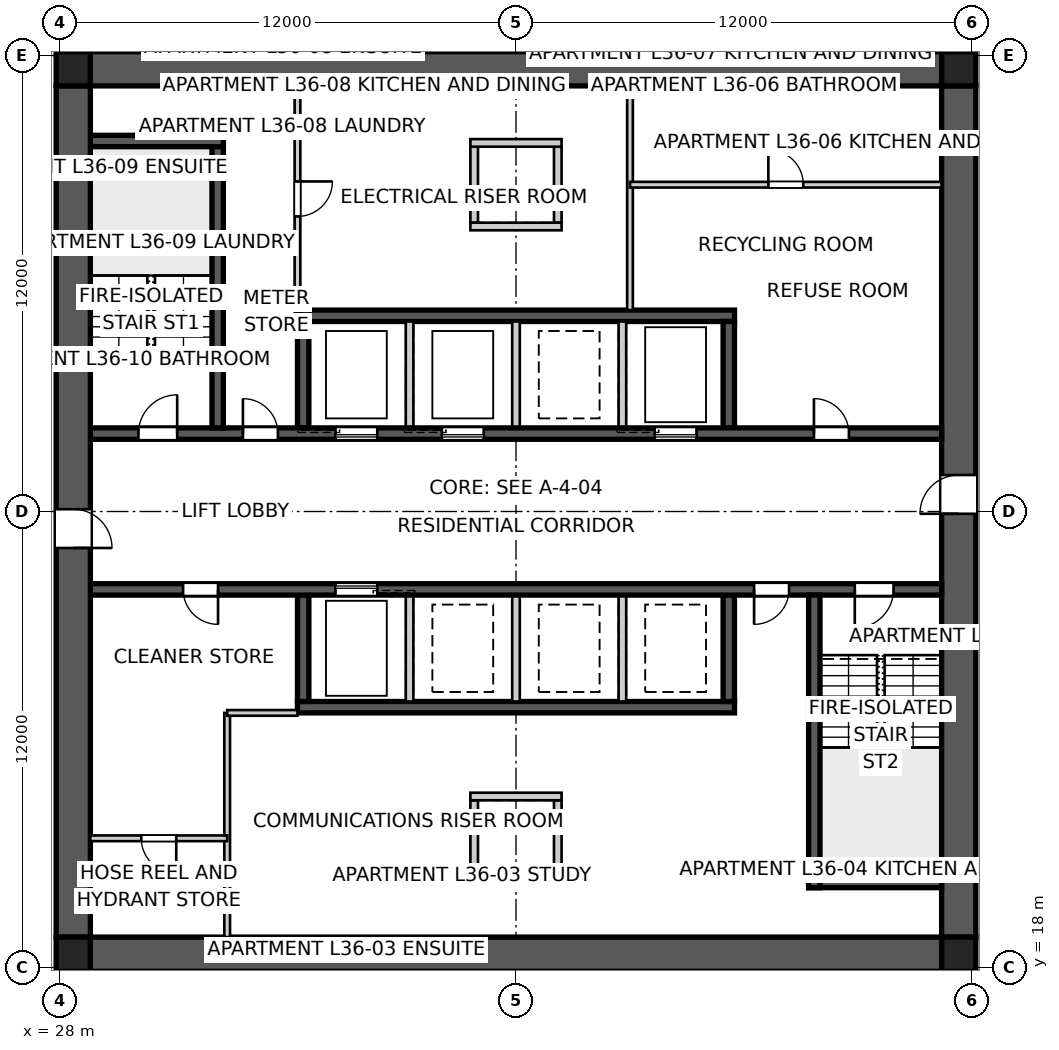
"""IFC4 building model, lengths in metres.
Left out: names, types, materials, properties, quantities, classifications, styles, units other than length and angle.
Written with IfcOpenShell. Run it as: python <this file> out.ifc"""

import sys

from ifc_helpers import new_model, si_unit, direction, frame, frame_2d, origin, origin_2d, place, context, subcontext, project, spatial, polyline, rectangle, outline, extrude, element, fill, save


model = new_model("IFC4")
c1 = context("Model", 3, precision=1e-05, world=origin(), true_north=direction((0.0, 1.0)))
c2 = subcontext(c1, "Body", "Model", "MODEL_VIEW")
j1 = project(units=[si_unit("LENGTHUNIT", "METRE"), si_unit("PLANEANGLEUNIT", "RADIAN")], contexts=[c1])
p1 = place(None, origin())
s1 = spatial("IfcSite", under=j1, at=p1, CompositionType="ELEMENT")
p2 = place(p1, origin())
s2 = spatial("IfcBuilding", under=s1, at=p2, CompositionType="ELEMENT")
p3 = place(p2, frame((0.0, 0.0, 132.0)))
s3 = spatial("IfcBuildingStorey", under=s2, at=p3, CompositionType="ELEMENT", Elevation=132.0)
for number, where, z_axis, x_axis in (
    (1, (28.8, 41.65, 0.0), (0.0, 0.0, 1.0), (1.0, 0.0, 0.0)),
    (2, (51.2, 18.35, 0.0), (0.0, 0.0, 1.0), (-1.0, 0.0, 0.0)),
):
    element("IfcWall", number, at=place(p3, frame(where, z_axis=z_axis, x_axis=x_axis)), inside=s3, PredefinedType="SHEAR", context=c2, shape_type="SweptSolid", body=[
        extrude(outline(polyline([(0.0, -0.45), (22.4, -0.45), (22.4, -0.025), (22.85, -0.025), (22.85, 0.025), (22.4, 0.025), (22.4, 0.45), (0.0, 0.45), (0.0, 0.025), (-0.45, 0.025), (-0.45, -0.025), (0.0, -0.025), (0.0, -0.45)])), origin(), (0.0, 0.0, 1.0), 3.4),
    ])
p4 = place(p3, frame((51.65, 18.8, 0.0), z_axis=(0.0, 0.0, 1.0), x_axis=(0.0, 1.0, 0.0)))
e3 = element("IfcWall", 3, at=p4, inside=s3, PredefinedType="SHEAR", context=c2, shape_type="SweptSolid", body=[
    extrude(outline(polyline([(0.0, -0.45), (22.4, -0.45), (22.4, -0.025), (22.85, -0.025), (22.85, 0.025), (22.4, 0.025), (22.4, 0.45), (0.0, 0.45), (0.0, 0.025), (-0.45, 0.025), (-0.45, -0.025), (0.0, -0.025), (0.0, -0.45)])), origin(), (0.0, 0.0, 1.0), 3.4),
])
p5 = place(p4, frame((11.14, 0.0, 0.0)))
e4 = element("IfcOpeningElement", 4, at=p5, cuts=e3, PredefinedType="OPENING", context=c2, shape_type="SweptSolid", body=[
    extrude(rectangle(XDim=1.02, YDim=2.4, at=frame_2d((0.51, 1.2))), frame((0.0, 0.46, 0.0), z_axis=(0.0, -1.0, 0.0), x_axis=(1.0, 0.0, 0.0)), (0.0, 0.0, 1.0), 0.92),
])
p6 = place(p3, frame((28.35, 41.2, 0.0), z_axis=(0.0, 0.0, 1.0), x_axis=(0.0, -1.0, 0.0)))
e5 = element("IfcWall", 5, at=p6, inside=s3, PredefinedType="SHEAR", context=c2, shape_type="SweptSolid", body=[
    extrude(outline(polyline([(0.0, -0.45), (22.4, -0.45), (22.4, -0.025), (22.85, -0.025), (22.85, 0.025), (22.4, 0.025), (22.4, 0.45), (0.0, 0.45), (0.0, 0.025), (-0.45, 0.025), (-0.45, -0.025), (0.0, -0.025), (0.0, -0.45)])), origin(), (0.0, 0.0, 1.0), 3.4),
])
p7 = place(p6, frame((11.14, 0.0, 0.0)))
e6 = element("IfcOpeningElement", 6, at=p7, cuts=e5, PredefinedType="OPENING", context=c2, shape_type="SweptSolid", body=[
    extrude(rectangle(XDim=1.02, YDim=2.4, at=frame_2d((0.51, 1.2))), frame((0.0, 0.46, 0.0), z_axis=(0.0, -1.0, 0.0), x_axis=(1.0, 0.0, 0.0)), (0.0, 0.0, 1.0), 0.92),
])
p8 = place(p3, frame((28.8, 32.05, 0.0), z_axis=(0.0, 0.0, 1.0), x_axis=(1.0, 0.0, 0.0)))
e7 = element("IfcWall", 7, at=p8, inside=s3, PredefinedType="SHEAR", context=c2, shape_type="SweptSolid", body=[
    extrude(rectangle(XDim=22.4, YDim=0.3, at=frame_2d((11.2, 0.0))), origin(), (0.0, 0.0, 1.0), 3.4),
])
p9 = place(p8, frame((19.04, 0.0, 0.0)))
e8 = element("IfcOpeningElement", 8, at=p9, cuts=e7, PredefinedType="OPENING", context=c2, shape_type="SweptSolid", body=[
    extrude(rectangle(XDim=0.92, YDim=2.1, at=frame_2d((0.46, 1.05))), frame((0.0, 0.16, 0.0), z_axis=(0.0, -1.0, 0.0), x_axis=(1.0, 0.0, 0.0)), (0.0, 0.0, 1.0), 0.32),
])
p10 = place(p8, frame((1.265, 0.0, 0.0)))
e9 = element("IfcOpeningElement", 9, at=p10, cuts=e7, PredefinedType="OPENING", context=c2, shape_type="SweptSolid", body=[
    extrude(rectangle(XDim=1.02, YDim=2.1, at=frame_2d((0.51, 1.05))), frame((0.0, 0.16, 0.0), z_axis=(0.0, -1.0, 0.0), x_axis=(1.0, 0.0, 0.0)), (0.0, 0.0, 1.0), 0.32),
])
p11 = place(p8, frame((4.015, 0.0, 0.0)))
e10 = element("IfcOpeningElement", 10, at=p11, cuts=e7, PredefinedType="OPENING", context=c2, shape_type="SweptSolid", body=[
    extrude(rectangle(XDim=0.92, YDim=2.1, at=frame_2d((0.46, 1.05))), frame((0.0, 0.16, 0.0), z_axis=(0.0, -1.0, 0.0), x_axis=(1.0, 0.0, 0.0)), (0.0, 0.0, 1.0), 0.32),
])
p12 = place(p8, frame((6.45, 0.0, 0.0)))
e11 = element("IfcOpeningElement", 11, at=p12, cuts=e7, PredefinedType="OPENING", context=c2, shape_type="SweptSolid", body=[
    extrude(rectangle(XDim=1.1, YDim=2.1, at=frame_2d((0.55, 1.05))), frame((0.0, 0.16, 0.0), z_axis=(0.0, -1.0, 0.0), x_axis=(1.0, 0.0, 0.0)), (0.0, 0.0, 1.0), 0.32),
])
p13 = place(p8, frame((9.25, 0.0, 0.0)))
e12 = element("IfcOpeningElement", 12, at=p13, cuts=e7, PredefinedType="OPENING", context=c2, shape_type="SweptSolid", body=[
    extrude(rectangle(XDim=1.1, YDim=2.1, at=frame_2d((0.55, 1.05))), frame((0.0, 0.16, 0.0), z_axis=(0.0, -1.0, 0.0), x_axis=(1.0, 0.0, 0.0)), (0.0, 0.0, 1.0), 0.32),
])
p14 = place(p8, frame((14.85, 0.0, 0.0)))
e13 = element("IfcOpeningElement", 13, at=p14, cuts=e7, PredefinedType="OPENING", context=c2, shape_type="SweptSolid", body=[
    extrude(rectangle(XDim=1.1, YDim=2.1, at=frame_2d((0.55, 1.05))), frame((0.0, 0.16, 0.0), z_axis=(0.0, -1.0, 0.0), x_axis=(1.0, 0.0, 0.0)), (0.0, 0.0, 1.0), 0.32),
])
p15 = place(p3, frame((51.2, 27.95, 0.0), z_axis=(0.0, 0.0, 1.0), x_axis=(-1.0, 0.0, 0.0)))
e14 = element("IfcWall", 14, at=p15, inside=s3, PredefinedType="SHEAR", context=c2, shape_type="SweptSolid", body=[
    extrude(rectangle(XDim=22.4, YDim=0.3, at=frame_2d((11.2, 0.0))), origin(), (0.0, 0.0, 1.0), 3.4),
])
p16 = place(p15, frame((19.04, 0.0, 0.0)))
e15 = element("IfcOpeningElement", 15, at=p16, cuts=e14, PredefinedType="OPENING", context=c2, shape_type="SweptSolid", body=[
    extrude(rectangle(XDim=0.92, YDim=2.1, at=frame_2d((0.46, 1.05))), frame((0.0, 0.16, 0.0), z_axis=(0.0, -1.0, 0.0), x_axis=(1.0, 0.0, 0.0)), (0.0, 0.0, 1.0), 0.32),
])
p17 = place(p15, frame((1.265, 0.0, 0.0)))
e16 = element("IfcOpeningElement", 16, at=p17, cuts=e14, PredefinedType="OPENING", context=c2, shape_type="SweptSolid", body=[
    extrude(rectangle(XDim=1.02, YDim=2.1, at=frame_2d((0.51, 1.05))), frame((0.0, 0.16, 0.0), z_axis=(0.0, -1.0, 0.0), x_axis=(1.0, 0.0, 0.0)), (0.0, 0.0, 1.0), 0.32),
])
p18 = place(p15, frame((4.015, 0.0, 0.0)))
e17 = element("IfcOpeningElement", 17, at=p18, cuts=e14, PredefinedType="OPENING", context=c2, shape_type="SweptSolid", body=[
    extrude(rectangle(XDim=0.92, YDim=2.1, at=frame_2d((0.46, 1.05))), frame((0.0, 0.16, 0.0), z_axis=(0.0, -1.0, 0.0), x_axis=(1.0, 0.0, 0.0)), (0.0, 0.0, 1.0), 0.32),
])
p19 = place(p15, frame((14.85, 0.0, 0.0)))
e18 = element("IfcOpeningElement", 18, at=p19, cuts=e14, PredefinedType="OPENING", context=c2, shape_type="SweptSolid", body=[
    extrude(rectangle(XDim=1.1, YDim=2.1, at=frame_2d((0.55, 1.05))), frame((0.0, 0.16, 0.0), z_axis=(0.0, -1.0, 0.0), x_axis=(1.0, 0.0, 0.0)), (0.0, 0.0, 1.0), 0.32),
])
for number, where, z_axis, x_axis in (
    (19, (34.25, 35.15, 0.0), (0.0, 0.0, 1.0), (1.0, 0.0, 0.0)),
    (20, (45.75, 24.85, 0.0), (0.0, 0.0, 1.0), (-1.0, 0.0, 0.0)),
):
    element("IfcWall", number, at=place(p3, frame(where, z_axis=z_axis, x_axis=x_axis)), inside=s3, PredefinedType="SHEAR", context=c2, shape_type="SweptSolid", body=[
        extrude(rectangle(XDim=11.5, YDim=0.3, at=frame_2d((5.75, 0.0))), origin(), (0.0, 0.0, 1.0), 3.4),
    ])
for number, where, z_axis, x_axis in (
    (21, (34.4, 32.2, 0.0), (0.0, 0.0, 1.0), (0.0, 1.0, 0.0)),
    (22, (45.6, 27.8, 0.0), (0.0, 0.0, 1.0), (0.0, -1.0, 0.0)),
):
    element("IfcWall", number, at=place(p3, frame(where, z_axis=z_axis, x_axis=x_axis)), inside=s3, PredefinedType="SHEAR", context=c2, shape_type="SweptSolid", body=[
        extrude(rectangle(XDim=2.8, YDim=0.3, at=frame_2d((1.4, 0.0))), origin(), (0.0, 0.0, 1.0), 3.4),
    ])
for number, where, z_axis, x_axis in (
    (23, (37.2, 32.2, 0.0), (0.0, 0.0, 1.0), (0.0, 1.0, 0.0)),
    (24, (42.8, 27.8, 0.0), (0.0, 0.0, 1.0), (0.0, -1.0, 0.0)),
    (25, (40.0, 32.2, 0.0), (0.0, 0.0, 1.0), (0.0, 1.0, 0.0)),
    (26, (40.0, 27.8, 0.0), (0.0, 0.0, 1.0), (0.0, -1.0, 0.0)),
    (27, (42.8, 32.2, 0.0), (0.0, 0.0, 1.0), (0.0, 1.0, 0.0)),
    (28, (37.2, 27.8, 0.0), (0.0, 0.0, 1.0), (0.0, -1.0, 0.0)),
):
    element("IfcWall", number, at=place(p3, frame(where, z_axis=z_axis, x_axis=x_axis)), inside=s3, PredefinedType="SOLIDWALL", context=c2, shape_type="SweptSolid", body=[
        extrude(rectangle(XDim=2.8, YDim=0.2, at=frame_2d((1.4, 0.0))), origin(), (0.0, 0.0, 1.0), 3.4),
    ])
for number, where, z_axis, x_axis in (
    (29, (45.6, 32.2, 0.0), (0.0, 0.0, 1.0), (0.0, 1.0, 0.0)),
    (30, (34.4, 27.8, 0.0), (0.0, 0.0, 1.0), (0.0, -1.0, 0.0)),
):
    element("IfcWall", number, at=place(p3, frame(where, z_axis=z_axis, x_axis=x_axis)), inside=s3, PredefinedType="SHEAR", context=c2, shape_type="SweptSolid", body=[
        extrude(rectangle(XDim=2.8, YDim=0.3, at=frame_2d((1.4, 0.0))), origin(), (0.0, 0.0, 1.0), 3.4),
    ])
p20 = place(p3, frame((32.15, 32.2, 0.0), z_axis=(0.0, 0.0, 1.0), x_axis=(0.0, 1.0, 0.0)))
e31 = element("IfcWall", 31, at=p20, inside=s3, PredefinedType="SHEAR", context=c2, shape_type="SweptSolid", body=[
    extrude(rectangle(XDim=7.7, YDim=0.3, at=frame_2d((3.85, 0.0))), origin(), (0.0, 0.0, 1.0), 3.4),
])
p21 = place(p3, frame((28.8, 39.75, 0.0), z_axis=(0.0, 0.0, 1.0), x_axis=(1.0, 0.0, 0.0)))
e32 = element("IfcWall", 32, at=p21, inside=s3, PredefinedType="SHEAR", context=c2, shape_type="SweptSolid", body=[
    extrude(rectangle(XDim=3.5, YDim=0.3, at=frame_2d((1.75, 0.0))), origin(), (0.0, 0.0, 1.0), 3.4),
])
p22 = place(p3, frame((47.85, 27.8, 0.0), z_axis=(0.0, 0.0, 1.0), x_axis=(0.0, -1.0, 0.0)))
e33 = element("IfcWall", 33, at=p22, inside=s3, PredefinedType="SHEAR", context=c2, shape_type="SweptSolid", body=[
    extrude(rectangle(XDim=7.7, YDim=0.3, at=frame_2d((3.85, 0.0))), origin(), (0.0, 0.0, 1.0), 3.4),
])
p23 = place(p3, frame((51.2, 20.25, 0.0), z_axis=(0.0, 0.0, 1.0), x_axis=(-1.0, 0.0, 0.0)))
e34 = element("IfcWall", 34, at=p23, inside=s3, PredefinedType="SHEAR", context=c2, shape_type="SweptSolid", body=[
    extrude(rectangle(XDim=3.5, YDim=0.3, at=frame_2d((1.75, 0.0))), origin(), (0.0, 0.0, 1.0), 3.4),
])
for number, where, z_axis, x_axis in (
    (35, (38.9, 37.6, 0.0), (0.0, 0.0, 1.0), (0.0, 1.0, 0.0)),
    (36, (41.1, 37.6, 0.0), (0.0, 0.0, 1.0), (0.0, 1.0, 0.0)),
):
    element("IfcWall", number, at=place(p3, frame(where, z_axis=z_axis, x_axis=x_axis)), inside=s3, PredefinedType="SOLIDWALL", context=c2, shape_type="SweptSolid", body=[
        extrude(rectangle(XDim=2.0, YDim=0.2, at=frame_2d((1.0, 0.0))), origin(), (0.0, 0.0, 1.0), 3.4),
    ])
for number, where, z_axis, x_axis in (
    (37, (38.8, 37.5, 0.0), (0.0, 0.0, 1.0), (1.0, 0.0, 0.0)),
    (38, (38.8, 39.7, 0.0), (0.0, 0.0, 1.0), (1.0, 0.0, 0.0)),
):
    element("IfcWall", number, at=place(p3, frame(where, z_axis=z_axis, x_axis=x_axis)), inside=s3, PredefinedType="SOLIDWALL", context=c2, shape_type="SweptSolid", body=[
        extrude(rectangle(XDim=2.4, YDim=0.2, at=frame_2d((1.2, 0.0))), origin(), (0.0, 0.0, 1.0), 3.4),
    ])
for number, where, z_axis, x_axis in (
    (39, (38.9, 22.4, 0.0), (0.0, 0.0, 1.0), (0.0, -1.0, 0.0)),
    (40, (41.1, 22.4, 0.0), (0.0, 0.0, 1.0), (0.0, -1.0, 0.0)),
):
    element("IfcWall", number, at=place(p3, frame(where, z_axis=z_axis, x_axis=x_axis)), inside=s3, PredefinedType="SOLIDWALL", context=c2, shape_type="SweptSolid", body=[
        extrude(rectangle(XDim=2.0, YDim=0.2, at=frame_2d((1.0, 0.0))), origin(), (0.0, 0.0, 1.0), 3.4),
    ])
for number, where, z_axis, x_axis in (
    (41, (38.8, 22.5, 0.0), (0.0, 0.0, 1.0), (1.0, 0.0, 0.0)),
    (42, (38.8, 20.3, 0.0), (0.0, 0.0, 1.0), (1.0, 0.0, 0.0)),
):
    element("IfcWall", number, at=place(p3, frame(where, z_axis=z_axis, x_axis=x_axis)), inside=s3, PredefinedType="SOLIDWALL", context=c2, shape_type="SweptSolid", body=[
        extrude(rectangle(XDim=2.4, YDim=0.2, at=frame_2d((1.2, 0.0))), origin(), (0.0, 0.0, 1.0), 3.4),
    ])
for number, where, z_axis, x_axis in (
    (43, (28.35, 18.35, 0.0), (0.0, 0.0, 1.0), (1.0, 0.0, 0.0)),
    (44, (51.65, 18.35, 0.0), (0.0, 0.0, 1.0), (1.0, 0.0, 0.0)),
    (45, (51.65, 41.65, 0.0), (0.0, 0.0, 1.0), (1.0, 0.0, 0.0)),
    (46, (28.35, 41.65, 0.0), (0.0, 0.0, 1.0), (1.0, 0.0, 0.0)),
):
    element("IfcColumn", number, at=place(p3, frame(where, z_axis=z_axis, x_axis=x_axis)), inside=s3, PredefinedType="COLUMN", context=c2, shape_type="SweptSolid", body=[
        extrude(rectangle(XDim=0.9, YDim=0.9, at=origin_2d()), origin(), (0.0, 0.0, 1.0), 3.4),
    ])
p24 = place(p3, frame((34.25, 41.2, 0.0), z_axis=(0.0, 0.0, 1.0), x_axis=(0.0, -1.0, 0.0)))
e47 = element("IfcWall", 47, at=p24, inside=s3, PredefinedType="SOLIDWALL", context=c2, shape_type="SweptSolid", body=[
    extrude(rectangle(XDim=5.95, YDim=0.15, at=frame_2d((2.975, 0.0))), origin(), (0.0, 0.0, 1.0), 3.25),
])
p25 = place(p24, frame((2.515, 0.0, 0.0)))
e48 = element("IfcOpeningElement", 48, at=p25, cuts=e47, PredefinedType="OPENING", context=c2, shape_type="SweptSolid", body=[
    extrude(rectangle(XDim=0.92, YDim=2.1, at=frame_2d((0.46, 1.05))), frame((0.0, 0.085, 0.0), z_axis=(0.0, -1.0, 0.0), x_axis=(1.0, 0.0, 0.0)), (0.0, 0.0, 1.0), 0.17),
])
p26 = place(p3, frame((43.0, 41.2, 0.0), z_axis=(0.0, 0.0, 1.0), x_axis=(0.0, -1.0, 0.0)))
e49 = element("IfcWall", 49, at=p26, inside=s3, PredefinedType="SOLIDWALL", context=c2, shape_type="SweptSolid", body=[
    extrude(rectangle(XDim=5.9, YDim=0.15, at=frame_2d((2.95, 0.0))), origin(), (0.0, 0.0, 1.0), 3.25),
])
p27 = place(p3, frame((43.0, 38.6, 0.0), z_axis=(0.0, 0.0, 1.0), x_axis=(1.0, 0.0, 0.0)))
e50 = element("IfcWall", 50, at=p27, inside=s3, PredefinedType="SOLIDWALL", context=c2, shape_type="SweptSolid", body=[
    extrude(rectangle(XDim=8.2, YDim=0.15, at=frame_2d((4.1, 0.0))), origin(), (0.0, 0.0, 1.0), 3.25),
])
p28 = place(p27, frame((3.64, 0.0, 0.0)))
e51 = element("IfcOpeningElement", 51, at=p28, cuts=e50, PredefinedType="OPENING", context=c2, shape_type="SweptSolid", body=[
    extrude(rectangle(XDim=0.92, YDim=2.1, at=frame_2d((0.46, 1.05))), frame((0.0, 0.085, 0.0), z_axis=(0.0, -1.0, 0.0), x_axis=(1.0, 0.0, 0.0)), (0.0, 0.0, 1.0), 0.17),
])
p29 = place(p3, frame((32.4, 18.8, 0.0), z_axis=(0.0, 0.0, 1.0), x_axis=(0.0, 1.0, 0.0)))
e52 = element("IfcWall", 52, at=p29, inside=s3, PredefinedType="SOLIDWALL", context=c2, shape_type="SweptSolid", body=[
    extrude(rectangle(XDim=5.9, YDim=0.15, at=frame_2d((2.95, 0.0))), origin(), (0.0, 0.0, 1.0), 3.25),
])
p30 = place(p3, frame((32.4, 24.7, 0.0), z_axis=(0.0, 0.0, 1.0), x_axis=(1.0, 0.0, 0.0)))
e53 = element("IfcWall", 53, at=p30, inside=s3, PredefinedType="SOLIDWALL", context=c2, shape_type="SweptSolid", body=[
    extrude(rectangle(XDim=1.85, YDim=0.15, at=frame_2d((0.925, 0.0))), origin(), (0.0, 0.0, 1.0), 3.25),
])
p31 = place(p3, frame((32.4, 21.4, 0.0), z_axis=(0.0, 0.0, 1.0), x_axis=(-1.0, 0.0, 0.0)))
e54 = element("IfcWall", 54, at=p31, inside=s3, PredefinedType="SOLIDWALL", context=c2, shape_type="SweptSolid", body=[
    extrude(rectangle(XDim=3.6, YDim=0.15, at=frame_2d((1.8, 0.0))), origin(), (0.0, 0.0, 1.0), 3.25),
])
p32 = place(p31, frame((1.34, 0.0, 0.0)))
e55 = element("IfcOpeningElement", 55, at=p32, cuts=e54, PredefinedType="OPENING", context=c2, shape_type="SweptSolid", body=[
    extrude(rectangle(XDim=0.92, YDim=2.1, at=frame_2d((0.46, 1.05))), frame((0.0, 0.085, 0.0), z_axis=(0.0, -1.0, 0.0), x_axis=(1.0, 0.0, 0.0)), (0.0, 0.0, 1.0), 0.17),
])
p33 = place(p9, origin())
e56 = element("IfcDoor", 56, at=p33, inside=s3, OperationType="SINGLE_SWING_LEFT", PredefinedType="DOOR", context=c2, shape_type="SweptSolid", body=[
    extrude(rectangle(XDim=0.92, YDim=2.1, at=frame_2d((0.46, 1.05))), frame((0.0, 0.025, 0.0), z_axis=(0.0, -1.0, 0.0), x_axis=(1.0, 0.0, 0.0)), (0.0, 0.0, 1.0), 0.05),
])
fill(e8, e56)
p34 = place(p16, origin())
e57 = element("IfcDoor", 57, at=p34, inside=s3, OperationType="SINGLE_SWING_LEFT", PredefinedType="DOOR", context=c2, shape_type="SweptSolid", body=[
    extrude(rectangle(XDim=0.92, YDim=2.1, at=frame_2d((0.46, 1.05))), frame((0.0, 0.025, 0.0), z_axis=(0.0, -1.0, 0.0), x_axis=(1.0, 0.0, 0.0)), (0.0, 0.0, 1.0), 0.05),
])
fill(e15, e57)
p35 = place(p17, origin())
e58 = element("IfcDoor", 58, at=p35, inside=s3, OperationType="SINGLE_SWING_RIGHT", PredefinedType="DOOR", context=c2, shape_type="SweptSolid", body=[
    extrude(rectangle(XDim=1.02, YDim=2.1, at=frame_2d((0.51, 1.05))), frame((0.0, 0.025, 0.0), z_axis=(0.0, -1.0, 0.0), x_axis=(1.0, 0.0, 0.0)), (0.0, 0.0, 1.0), 0.05),
])
fill(e16, e58)
p36 = place(p10, origin())
e59 = element("IfcDoor", 59, at=p36, inside=s3, OperationType="SINGLE_SWING_RIGHT", PredefinedType="DOOR", context=c2, shape_type="SweptSolid", body=[
    extrude(rectangle(XDim=1.02, YDim=2.1, at=frame_2d((0.51, 1.05))), frame((0.0, 0.025, 0.0), z_axis=(0.0, -1.0, 0.0), x_axis=(1.0, 0.0, 0.0)), (0.0, 0.0, 1.0), 0.05),
])
fill(e9, e59)
p37 = place(p11, origin())
e60 = element("IfcDoor", 60, at=p37, inside=s3, OperationType="SINGLE_SWING_LEFT", PredefinedType="DOOR", context=c2, shape_type="SweptSolid", body=[
    extrude(rectangle(XDim=0.92, YDim=2.1, at=frame_2d((0.46, 1.05))), frame((0.0, 0.025, 0.0), z_axis=(0.0, -1.0, 0.0), x_axis=(1.0, 0.0, 0.0)), (0.0, 0.0, 1.0), 0.05),
])
fill(e10, e60)
p38 = place(p18, origin())
e61 = element("IfcDoor", 61, at=p38, inside=s3, OperationType="SINGLE_SWING_RIGHT", PredefinedType="DOOR", context=c2, shape_type="SweptSolid", body=[
    extrude(rectangle(XDim=0.92, YDim=2.1, at=frame_2d((0.46, 1.05))), frame((0.0, 0.025, 0.0), z_axis=(0.0, -1.0, 0.0), x_axis=(1.0, 0.0, 0.0)), (0.0, 0.0, 1.0), 0.05),
])
fill(e17, e61)
p39 = place(p28, origin())
e62 = element("IfcDoor", 62, at=p39, inside=s3, OperationType="SINGLE_SWING_LEFT", PredefinedType="DOOR", context=c2, shape_type="SweptSolid", body=[
    extrude(rectangle(XDim=0.92, YDim=2.1, at=frame_2d((0.46, 1.05))), frame((0.0, 0.025, 0.0), z_axis=(0.0, -1.0, 0.0), x_axis=(1.0, 0.0, 0.0)), (0.0, 0.0, 1.0), 0.05),
])
fill(e51, e62)
p40 = place(p32, origin())
e63 = element("IfcDoor", 63, at=p40, inside=s3, OperationType="SINGLE_SWING_LEFT", PredefinedType="DOOR", context=c2, shape_type="SweptSolid", body=[
    extrude(rectangle(XDim=0.92, YDim=2.1, at=frame_2d((0.46, 1.05))), frame((0.0, 0.025, 0.0), z_axis=(0.0, -1.0, 0.0), x_axis=(1.0, 0.0, 0.0)), (0.0, 0.0, 1.0), 0.05),
])
fill(e55, e63)
p41 = place(p25, origin())
e64 = element("IfcDoor", 64, at=p41, inside=s3, OperationType="SINGLE_SWING_LEFT", PredefinedType="DOOR", context=c2, shape_type="SweptSolid", body=[
    extrude(rectangle(XDim=0.92, YDim=2.1, at=frame_2d((0.46, 1.05))), frame((0.0, 0.025, 0.0), z_axis=(0.0, -1.0, 0.0), x_axis=(1.0, 0.0, 0.0)), (0.0, 0.0, 1.0), 0.05),
])
fill(e48, e64)
p42 = place(p5, origin())
e65 = element("IfcDoor", 65, at=p42, inside=s3, OperationType="SINGLE_SWING_LEFT", PredefinedType="DOOR", context=c2, shape_type="SweptSolid", body=[
    extrude(rectangle(XDim=1.02, YDim=2.4, at=frame_2d((0.51, 1.2))), frame((0.0, 0.025, 0.0), z_axis=(0.0, -1.0, 0.0), x_axis=(1.0, 0.0, 0.0)), (0.0, 0.0, 1.0), 0.05),
])
fill(e4, e65)
p43 = place(p7, origin())
e66 = element("IfcDoor", 66, at=p43, inside=s3, OperationType="SINGLE_SWING_RIGHT", PredefinedType="DOOR", context=c2, shape_type="SweptSolid", body=[
    extrude(rectangle(XDim=1.02, YDim=2.4, at=frame_2d((0.51, 1.2))), frame((0.0, 0.025, 0.0), z_axis=(0.0, -1.0, 0.0), x_axis=(1.0, 0.0, 0.0)), (0.0, 0.0, 1.0), 0.05),
])
fill(e6, e66)
p44 = place(p12, origin())
e67 = element("IfcDoor", 67, at=p44, inside=s3, OperationType="SLIDING_TO_LEFT", PredefinedType="DOOR", context=c2, shape_type="SweptSolid", body=[
    extrude(rectangle(XDim=1.1, YDim=2.1, at=frame_2d((0.55, 1.05))), frame((0.0, 0.025, 0.0), z_axis=(0.0, -1.0, 0.0), x_axis=(1.0, 0.0, 0.0)), (0.0, 0.0, 1.0), 0.05),
])
fill(e11, e67)
p45 = place(p13, origin())
e68 = element("IfcDoor", 68, at=p45, inside=s3, OperationType="SLIDING_TO_LEFT", PredefinedType="DOOR", context=c2, shape_type="SweptSolid", body=[
    extrude(rectangle(XDim=1.1, YDim=2.1, at=frame_2d((0.55, 1.05))), frame((0.0, 0.025, 0.0), z_axis=(0.0, -1.0, 0.0), x_axis=(1.0, 0.0, 0.0)), (0.0, 0.0, 1.0), 0.05),
])
fill(e12, e68)
p46 = place(p14, origin())
e69 = element("IfcDoor", 69, at=p46, inside=s3, OperationType="SLIDING_TO_LEFT", PredefinedType="DOOR", context=c2, shape_type="SweptSolid", body=[
    extrude(rectangle(XDim=1.1, YDim=2.1, at=frame_2d((0.55, 1.05))), frame((0.0, 0.025, 0.0), z_axis=(0.0, -1.0, 0.0), x_axis=(1.0, 0.0, 0.0)), (0.0, 0.0, 1.0), 0.05),
])
fill(e13, e69)
p47 = place(p19, origin())
e70 = element("IfcDoor", 70, at=p47, inside=s3, OperationType="SLIDING_TO_LEFT", PredefinedType="DOOR", context=c2, shape_type="SweptSolid", body=[
    extrude(rectangle(XDim=1.1, YDim=2.1, at=frame_2d((0.55, 1.05))), frame((0.0, 0.025, 0.0), z_axis=(0.0, -1.0, 0.0), x_axis=(1.0, 0.0, 0.0)), (0.0, 0.0, 1.0), 0.05),
])
fill(e18, e70)
save(model, sys.argv[1])
